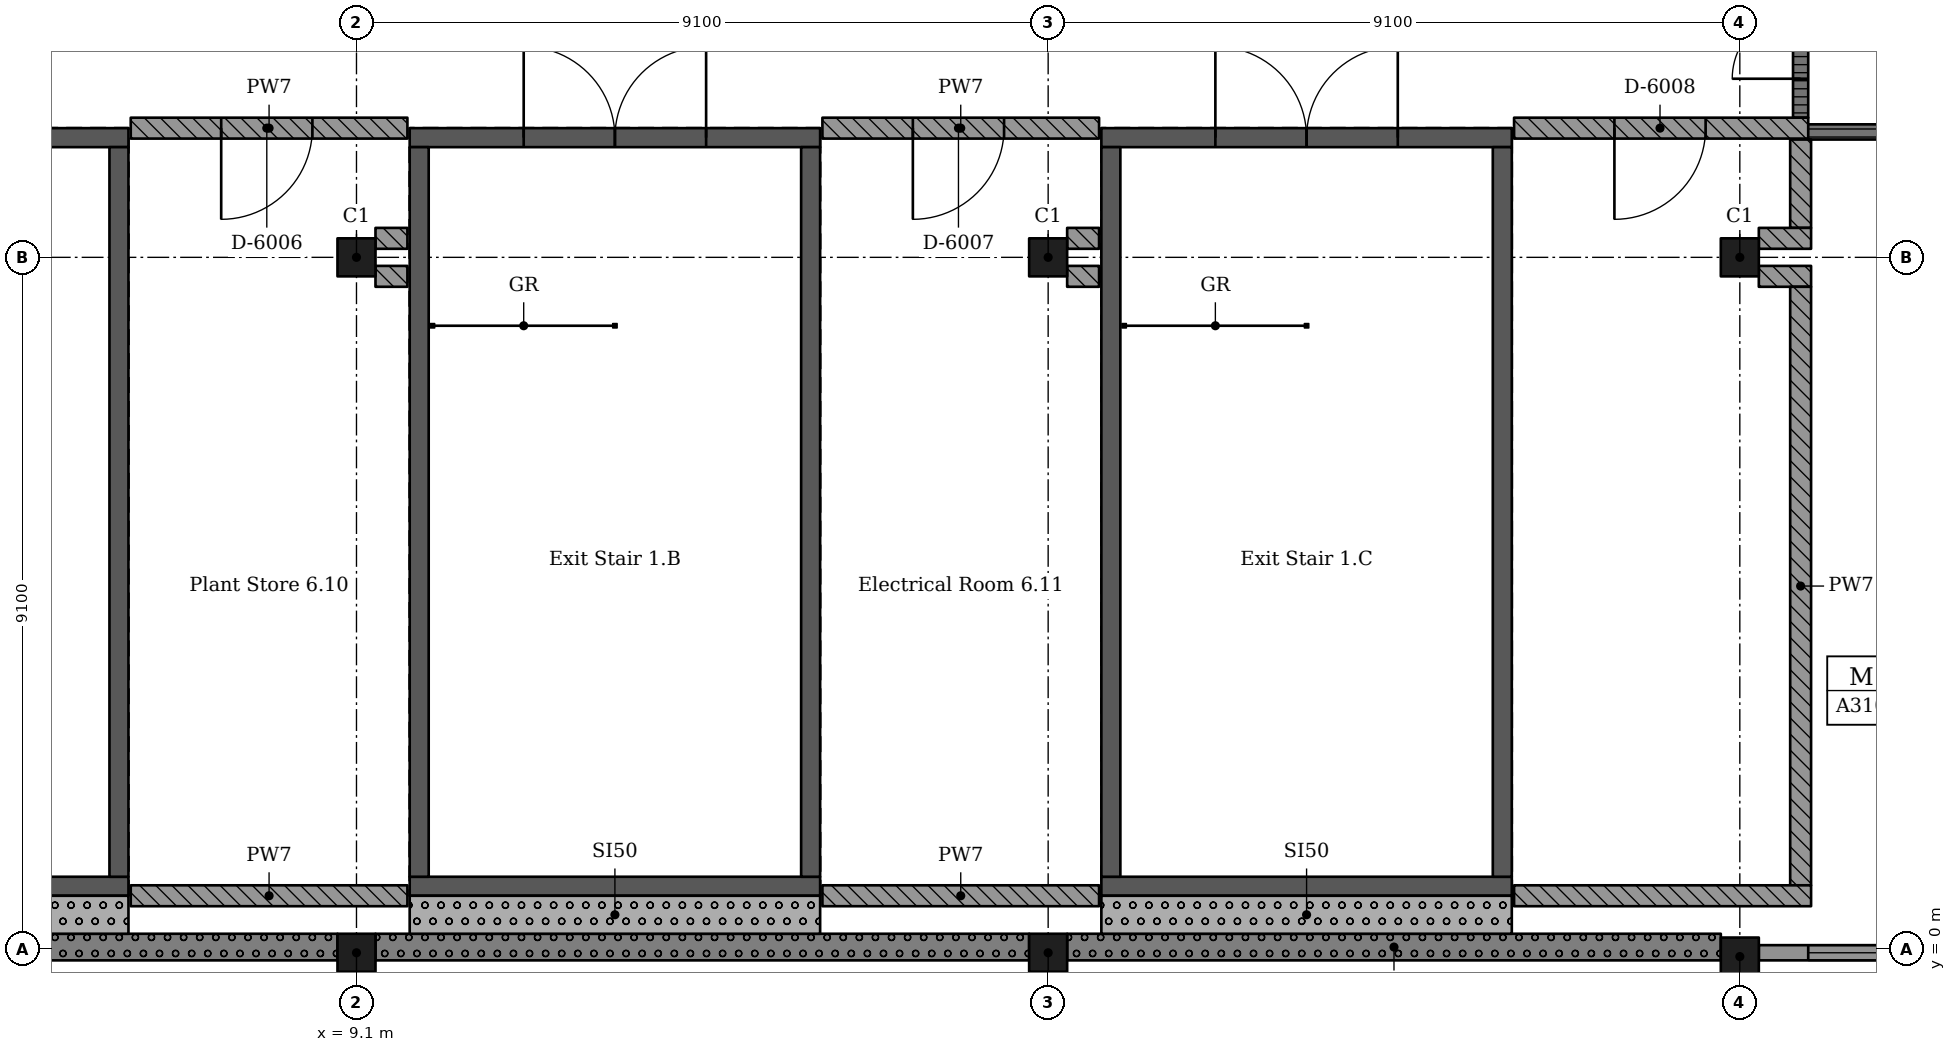
"""IFC4 building model, lengths in metres.
Left out: names, types, materials, properties, quantities, classifications, styles, units other than length and angle.
Written with IfcOpenShell. Run it as: python <this file> out.ifc"""

import sys

from ifc_helpers import new_model, si_unit, direction, frame, frame_2d, origin, origin_2d, place, context, subcontext, project, spatial, rectangle, extrude, element, fill, save


model = new_model("IFC4")
c1 = context("Model", 3, precision=1e-05, world=origin(), true_north=direction((0.0, 1.0)))
c2 = subcontext(c1, "Body", "Model", "MODEL_VIEW")
j1 = project(units=[si_unit("LENGTHUNIT", "METRE"), si_unit("PLANEANGLEUNIT", "RADIAN")], contexts=[c1])
p1 = place(None, origin())
s1 = spatial("IfcSite", under=j1, at=p1, CompositionType="ELEMENT")
p2 = place(p1, origin())
s2 = spatial("IfcBuilding", under=s1, at=p2, CompositionType="ELEMENT")
p3 = place(p2, frame((0.0, 0.0, 29.12)))
s3 = spatial("IfcBuildingStorey", under=s2, at=p3, CompositionType="ELEMENT", Elevation=29.12)
for number, where, z_axis, x_axis in (
    (1, (9.1, -0.05, 0.0), (0.0, 0.0, 1.0), (1.0, 0.0, 0.0)),
    (2, (9.1, 9.1, 0.0), (0.0, 0.0, 1.0), (1.0, 0.0, 0.0)),
    (3, (18.2, -0.05, 0.0), (0.0, 0.0, 1.0), (1.0, 0.0, 0.0)),
    (4, (18.2, 9.1, 0.0), (0.0, 0.0, 1.0), (1.0, 0.0, 0.0)),
    (5, (27.3, -0.1, 0.0), (0.0, 0.0, 1.0), (1.0, 0.0, 0.0)),
    (6, (27.3, 9.1, 0.0), (0.0, 0.0, 1.0), (1.0, 0.0, 0.0)),
):
    element("IfcColumn", number, at=place(p3, frame(where, z_axis=z_axis, x_axis=x_axis)), inside=s3, PredefinedType="COLUMN", context=c2, shape_type="SweptSolid", body=[
        extrude(rectangle(XDim=0.5, YDim=0.5, at=origin_2d()), origin(), (0.0, 0.0, 1.0), 4.55),
    ])
p4 = place(p3, frame((6.1, 0.825, 0.0), z_axis=(0.0, 0.0, 1.0), x_axis=(-1.0, 0.0, 0.0)))
e7 = element("IfcWall", 7, at=p4, inside=s3, PredefinedType="SHEAR", context=c2, shape_type="SweptSolid", body=[
    extrude(rectangle(XDim=5.4, YDim=0.25, at=frame_2d((2.7, 0.0))), origin(), (0.0, 0.0, 1.0), 4.55),
])
p5 = place(p3, frame((6.1, 10.675, 0.0), z_axis=(0.0, 0.0, 1.0), x_axis=(-1.0, 0.0, 0.0)))
e8 = element("IfcWall", 8, at=p5, inside=s3, PredefinedType="SHEAR", context=c2, shape_type="SweptSolid", body=[
    extrude(rectangle(XDim=5.4, YDim=0.25, at=frame_2d((2.7, 0.0))), origin(), (0.0, 0.0, 1.0), 4.55),
])
p6 = place(p5, frame((1.5, 0.0, 0.0)))
e9 = element("IfcOpeningElement", 9, at=p6, cuts=e8, PredefinedType="OPENING", context=c2, shape_type="SweptSolid", body=[
    extrude(rectangle(XDim=2.4, YDim=2.1, at=frame_2d((1.2, 1.05))), frame((0.0, 0.135, 0.0), z_axis=(0.0, -1.0, 0.0), x_axis=(1.0, 0.0, 0.0)), (0.0, 0.0, 1.0), 0.27),
])
p7 = place(p3, frame((5.975, 10.55, 0.0), z_axis=(0.0, 0.0, 1.0), x_axis=(0.0, -1.0, 0.0)))
e10 = element("IfcWall", 10, at=p7, inside=s3, PredefinedType="SHEAR", context=c2, shape_type="SweptSolid", body=[
    extrude(rectangle(XDim=9.6, YDim=0.25, at=frame_2d((4.8, 0.0))), origin(), (0.0, 0.0, 1.0), 4.55),
])
p8 = place(p3, frame((15.2, 0.825, 0.0), z_axis=(0.0, 0.0, 1.0), x_axis=(-1.0, 0.0, 0.0)))
e11 = element("IfcWall", 11, at=p8, inside=s3, PredefinedType="SHEAR", context=c2, shape_type="SweptSolid", body=[
    extrude(rectangle(XDim=5.4, YDim=0.25, at=frame_2d((2.7, 0.0))), origin(), (0.0, 0.0, 1.0), 4.55),
])
p9 = place(p3, frame((15.2, 10.675, 0.0), z_axis=(0.0, 0.0, 1.0), x_axis=(-1.0, 0.0, 0.0)))
e12 = element("IfcWall", 12, at=p9, inside=s3, PredefinedType="SHEAR", context=c2, shape_type="SweptSolid", body=[
    extrude(rectangle(XDim=5.4, YDim=0.25, at=frame_2d((2.7, 0.0))), origin(), (0.0, 0.0, 1.0), 4.55),
])
p10 = place(p9, frame((1.5, 0.0, 0.0)))
e13 = element("IfcOpeningElement", 13, at=p10, cuts=e12, PredefinedType="OPENING", context=c2, shape_type="SweptSolid", body=[
    extrude(rectangle(XDim=2.4, YDim=2.1, at=frame_2d((1.2, 1.05))), frame((0.0, 0.135, 0.0), z_axis=(0.0, -1.0, 0.0), x_axis=(1.0, 0.0, 0.0)), (0.0, 0.0, 1.0), 0.27),
])
for number, where, z_axis, x_axis in (
    (14, (9.925, 10.55, 0.0), (0.0, 0.0, 1.0), (0.0, -1.0, 0.0)),
    (15, (15.075, 10.55, 0.0), (0.0, 0.0, 1.0), (0.0, -1.0, 0.0)),
):
    element("IfcWall", number, at=place(p3, frame(where, z_axis=z_axis, x_axis=x_axis)), inside=s3, PredefinedType="SHEAR", context=c2, shape_type="SweptSolid", body=[
        extrude(rectangle(XDim=9.6, YDim=0.25, at=frame_2d((4.8, 0.0))), origin(), (0.0, 0.0, 1.0), 4.55),
    ])
p11 = place(p3, frame((24.3, 0.825, 0.0), z_axis=(0.0, 0.0, 1.0), x_axis=(-1.0, 0.0, 0.0)))
e16 = element("IfcWall", 16, at=p11, inside=s3, PredefinedType="SHEAR", context=c2, shape_type="SweptSolid", body=[
    extrude(rectangle(XDim=5.4, YDim=0.25, at=frame_2d((2.7, 0.0))), origin(), (0.0, 0.0, 1.0), 4.55),
])
p12 = place(p3, frame((24.3, 10.675, 0.0), z_axis=(0.0, 0.0, 1.0), x_axis=(-1.0, 0.0, 0.0)))
e17 = element("IfcWall", 17, at=p12, inside=s3, PredefinedType="SHEAR", context=c2, shape_type="SweptSolid", body=[
    extrude(rectangle(XDim=5.4, YDim=0.25, at=frame_2d((2.7, 0.0))), origin(), (0.0, 0.0, 1.0), 4.55),
])
p13 = place(p12, frame((1.5, 0.0, 0.0)))
e18 = element("IfcOpeningElement", 18, at=p13, cuts=e17, PredefinedType="OPENING", context=c2, shape_type="SweptSolid", body=[
    extrude(rectangle(XDim=2.4, YDim=2.1, at=frame_2d((1.2, 1.05))), frame((0.0, 0.135, 0.0), z_axis=(0.0, -1.0, 0.0), x_axis=(1.0, 0.0, 0.0)), (0.0, 0.0, 1.0), 0.27),
])
for number, where, z_axis, x_axis in (
    (19, (19.025, 10.55, 0.0), (0.0, 0.0, 1.0), (0.0, -1.0, 0.0)),
    (20, (24.175, 10.55, 0.0), (0.0, 0.0, 1.0), (0.0, -1.0, 0.0)),
):
    element("IfcWall", number, at=place(p3, frame(where, z_axis=z_axis, x_axis=x_axis)), inside=s3, PredefinedType="SHEAR", context=c2, shape_type="SweptSolid", body=[
        extrude(rectangle(XDim=9.6, YDim=0.25, at=frame_2d((4.8, 0.0))), origin(), (0.0, 0.0, 1.0), 4.55),
    ])
p14 = place(p3, frame((0.25, 0.025, 0.0), z_axis=(0.0, 0.0, 1.0), x_axis=(1.0, 0.0, 0.0)))
e21 = element("IfcWall", 21, at=p14, inside=s3, PredefinedType="SOLIDWALL", context=c2, shape_type="SweptSolid", body=[
    extrude(rectangle(XDim=8.6, YDim=0.35, at=frame_2d((4.3, 0.0))), origin(), (0.0, 0.0, 1.0), 4.5),
])
p15 = place(p3, frame((9.35, 0.025, 0.0), z_axis=(0.0, 0.0, 1.0), x_axis=(1.0, 0.0, 0.0)))
e22 = element("IfcWall", 22, at=p15, inside=s3, PredefinedType="SOLIDWALL", context=c2, shape_type="SweptSolid", body=[
    extrude(rectangle(XDim=8.6, YDim=0.35, at=frame_2d((4.3, 0.0))), origin(), (0.0, 0.0, 1.0), 4.5),
])
p16 = place(p3, frame((18.45, 0.025, 0.0), z_axis=(0.0, 0.0, 1.0), x_axis=(1.0, 0.0, 0.0)))
e23 = element("IfcWall", 23, at=p16, inside=s3, PredefinedType="SOLIDWALL", context=c2, shape_type="SweptSolid", body=[
    extrude(rectangle(XDim=8.6, YDim=0.35, at=frame_2d((4.3, 0.0))), origin(), (0.0, 0.0, 1.0), 4.5),
])
p17 = place(p3, frame((27.55, -0.05, 0.0), z_axis=(0.0, 0.0, 1.0), x_axis=(1.0, 0.0, 0.0)))
e24 = element("IfcWall", 24, at=p17, inside=s3, PredefinedType="SOLIDWALL", context=c2, shape_type="SweptSolid", body=[
    extrude(rectangle(XDim=8.6, YDim=0.2, at=frame_2d((4.3, 0.0))), origin(), (0.0, 0.0, 1.0), 4.5),
])
p18 = place(p17, frame((0.65, 0.0, 0.6)))
e25 = element("IfcOpeningElement", 25, at=p18, cuts=e24, PredefinedType="OPENING", context=c2, shape_type="SweptSolid", body=[
    extrude(rectangle(XDim=3.0, YDim=3.0, at=frame_2d((1.5, 1.5))), frame((0.0, 0.11, 0.0), z_axis=(0.0, -1.0, 0.0), x_axis=(1.0, 0.0, 0.0)), (0.0, 0.0, 1.0), 0.22),
])
p19 = place(p17, frame((4.95, 0.0, 0.6)))
e26 = element("IfcOpeningElement", 26, at=p19, cuts=e24, PredefinedType="OPENING", context=c2, shape_type="SweptSolid", body=[
    extrude(rectangle(XDim=3.0, YDim=3.0, at=frame_2d((1.5, 1.5))), frame((0.0, 0.11, 0.0), z_axis=(0.0, -1.0, 0.0), x_axis=(1.0, 0.0, 0.0)), (0.0, 0.0, 1.0), 0.22),
])
p20 = place(p3, frame((0.7, 0.45, 0.0), z_axis=(0.0, 0.0, 1.0), x_axis=(1.0, 0.0, 0.0)))
e27 = element("IfcWall", 27, at=p20, inside=s3, PredefinedType="SOLIDWALL", context=c2, shape_type="SweptSolid", body=[
    extrude(rectangle(XDim=5.4, YDim=0.5, at=frame_2d((2.7, 0.0))), origin(), (0.0, 0.0, 1.0), 3.88),
])
p21 = place(p3, frame((9.8, 0.45, 0.0), z_axis=(0.0, 0.0, 1.0), x_axis=(1.0, 0.0, 0.0)))
e28 = element("IfcWall", 28, at=p21, inside=s3, PredefinedType="SOLIDWALL", context=c2, shape_type="SweptSolid", body=[
    extrude(rectangle(XDim=5.4, YDim=0.5, at=frame_2d((2.7, 0.0))), origin(), (0.0, 0.0, 1.0), 3.88),
])
p22 = place(p3, frame((18.9, 0.45, 0.0), z_axis=(0.0, 0.0, 1.0), x_axis=(1.0, 0.0, 0.0)))
e29 = element("IfcWall", 29, at=p22, inside=s3, PredefinedType="SOLIDWALL", context=c2, shape_type="SweptSolid", body=[
    extrude(rectangle(XDim=5.4, YDim=0.5, at=frame_2d((2.7, 0.0))), origin(), (0.0, 0.0, 1.0), 3.88),
])
p23 = place(p3, frame((9.35, 8.85, 0.0), z_axis=(0.0, 0.0, 1.0), x_axis=(1.0, 0.0, 0.0)))
e30 = element("IfcWall", 30, at=p23, inside=s3, PredefinedType="SOLIDWALL", context=c2, shape_type="SweptSolid", body=[
    extrude(rectangle(XDim=0.42, YDim=0.275, at=frame_2d((0.21, 0.0))), origin(), (0.0, 0.0, 1.0), 3.88),
])
p24 = place(p3, frame((9.77, 0.7, 0.0), z_axis=(0.0, 0.0, 1.0), x_axis=(-1.0, 0.0, 0.0)))
e31 = element("IfcWall", 31, at=p24, inside=s3, PredefinedType="SOLIDWALL", context=c2, shape_type="SweptSolid", body=[
    extrude(rectangle(XDim=3.64, YDim=0.275, at=frame_2d((1.82, 0.0))), origin(), (0.0, 0.0, 1.0), 3.88),
])
p25 = place(p3, frame((9.77, 9.35, 0.0), z_axis=(0.0, 0.0, 1.0), x_axis=(-1.0, 0.0, 0.0)))
e32 = element("IfcWall", 32, at=p25, inside=s3, PredefinedType="SOLIDWALL", context=c2, shape_type="SweptSolid", body=[
    extrude(rectangle(XDim=0.42, YDim=0.275, at=frame_2d((0.21, 0.0))), origin(), (0.0, 0.0, 1.0), 3.88),
])
p26 = place(p3, frame((9.77, 10.8, 0.0), z_axis=(0.0, 0.0, 1.0), x_axis=(-1.0, 0.0, 0.0)))
e33 = element("IfcWall", 33, at=p26, inside=s3, PredefinedType="SOLIDWALL", context=c2, shape_type="SweptSolid", body=[
    extrude(rectangle(XDim=3.64, YDim=0.275, at=frame_2d((1.82, 0.0))), origin(), (0.0, 0.0, 1.0), 3.88),
])
p27 = place(p26, frame((1.25, 0.0, 0.0)))
e34 = element("IfcOpeningElement", 34, at=p27, cuts=e33, PredefinedType="OPENING", context=c2, shape_type="SweptSolid", body=[
    extrude(rectangle(XDim=1.2, YDim=2.4, at=frame_2d((0.6, 1.2))), frame((0.0, 0.147, 0.0), z_axis=(0.0, -1.0, 0.0), x_axis=(1.0, 0.0, 0.0)), (0.0, 0.0, 1.0), 0.295),
])
p28 = place(p3, frame((18.45, 8.85, 0.0), z_axis=(0.0, 0.0, 1.0), x_axis=(1.0, 0.0, 0.0)))
e35 = element("IfcWall", 35, at=p28, inside=s3, PredefinedType="SOLIDWALL", context=c2, shape_type="SweptSolid", body=[
    extrude(rectangle(XDim=0.42, YDim=0.275, at=frame_2d((0.21, 0.0))), origin(), (0.0, 0.0, 1.0), 3.88),
])
p29 = place(p3, frame((18.87, 0.7, 0.0), z_axis=(0.0, 0.0, 1.0), x_axis=(-1.0, 0.0, 0.0)))
e36 = element("IfcWall", 36, at=p29, inside=s3, PredefinedType="SOLIDWALL", context=c2, shape_type="SweptSolid", body=[
    extrude(rectangle(XDim=3.64, YDim=0.275, at=frame_2d((1.82, 0.0))), origin(), (0.0, 0.0, 1.0), 3.88),
])
p30 = place(p3, frame((18.87, 9.35, 0.0), z_axis=(0.0, 0.0, 1.0), x_axis=(-1.0, 0.0, 0.0)))
e37 = element("IfcWall", 37, at=p30, inside=s3, PredefinedType="SOLIDWALL", context=c2, shape_type="SweptSolid", body=[
    extrude(rectangle(XDim=0.42, YDim=0.275, at=frame_2d((0.21, 0.0))), origin(), (0.0, 0.0, 1.0), 3.88),
])
p31 = place(p3, frame((18.87, 10.8, 0.0), z_axis=(0.0, 0.0, 1.0), x_axis=(-1.0, 0.0, 0.0)))
e38 = element("IfcWall", 38, at=p31, inside=s3, PredefinedType="SOLIDWALL", context=c2, shape_type="SweptSolid", body=[
    extrude(rectangle(XDim=3.64, YDim=0.275, at=frame_2d((1.82, 0.0))), origin(), (0.0, 0.0, 1.0), 3.88),
])
p32 = place(p31, frame((1.25, 0.0, 0.0)))
e39 = element("IfcOpeningElement", 39, at=p32, cuts=e38, PredefinedType="OPENING", context=c2, shape_type="SweptSolid", body=[
    extrude(rectangle(XDim=1.2, YDim=2.4, at=frame_2d((0.6, 1.2))), frame((0.0, 0.147, 0.0), z_axis=(0.0, -1.0, 0.0), x_axis=(1.0, 0.0, 0.0)), (0.0, 0.0, 1.0), 0.295),
])
p33 = place(p3, frame((27.55, 8.85, 0.0), z_axis=(0.0, 0.0, 1.0), x_axis=(1.0, 0.0, 0.0)))
e40 = element("IfcWall", 40, at=p33, inside=s3, PredefinedType="SOLIDWALL", context=c2, shape_type="SweptSolid", body=[
    extrude(rectangle(XDim=0.688, YDim=0.275, at=frame_2d((0.344, 0.0))), origin(), (0.0, 0.0, 1.0), 3.88),
])
p34 = place(p3, frame((28.1, 8.712, 0.0), z_axis=(0.0, 0.0, 1.0), x_axis=(0.0, -1.0, 0.0)))
e41 = element("IfcWall", 41, at=p34, inside=s3, PredefinedType="SOLIDWALL", context=c2, shape_type="SweptSolid", body=[
    extrude(rectangle(XDim=7.875, YDim=0.275, at=frame_2d((3.938, 0.0))), origin(), (0.0, 0.0, 1.0), 3.88),
])
p35 = place(p3, frame((28.1, 10.65, 0.0), z_axis=(0.0, 0.0, 1.0), x_axis=(0.0, -1.0, 0.0)))
e42 = element("IfcWall", 42, at=p35, inside=s3, PredefinedType="SOLIDWALL", context=c2, shape_type="SweptSolid", body=[
    extrude(rectangle(XDim=1.162, YDim=0.275, at=frame_2d((0.581, 0.0))), origin(), (0.0, 0.0, 1.0), 3.88),
])
p36 = place(p3, frame((28.1, 13.7, 0.0), z_axis=(0.0, 0.0, 1.0), x_axis=(0.0, -1.0, 0.0)))
e43 = element("IfcWall", 43, at=p36, inside=s3, PredefinedType="PARTITIONING", context=c2, shape_type="SweptSolid", body=[
    extrude(rectangle(XDim=2.762, YDim=0.2, at=frame_2d((1.381, 0.0))), origin(), (0.0, 0.0, 1.0), 3.88),
])
p37 = place(p36, frame((0.45, 0.0, 0.0)))
e44 = element("IfcOpeningElement", 44, at=p37, cuts=e43, PredefinedType="OPENING", context=c2, shape_type="SweptSolid", body=[
    extrude(rectangle(XDim=1.8, YDim=2.4, at=frame_2d((0.9, 1.2))), frame((0.0, 0.11, 0.0), z_axis=(0.0, -1.0, 0.0), x_axis=(1.0, 0.0, 0.0)), (0.0, 0.0, 1.0), 0.22),
])
p38 = place(p3, frame((28.2, 10.8, 0.0), z_axis=(0.0, 0.0, 1.0), x_axis=(-1.0, 0.0, 0.0)))
e45 = element("IfcWall", 45, at=p38, inside=s3, PredefinedType="SOLIDWALL", context=c2, shape_type="SweptSolid", body=[
    extrude(rectangle(XDim=3.87, YDim=0.275, at=frame_2d((1.935, 0.0))), origin(), (0.0, 0.0, 1.0), 3.88),
])
p39 = place(p38, frame((1.35, 0.0, 0.0)))
e46 = element("IfcOpeningElement", 46, at=p39, cuts=e45, PredefinedType="OPENING", context=c2, shape_type="SweptSolid", body=[
    extrude(rectangle(XDim=1.2, YDim=2.4, at=frame_2d((0.6, 1.2))), frame((0.0, 0.147, 0.0), z_axis=(0.0, -1.0, 0.0), x_axis=(1.0, 0.0, 0.0)), (0.0, 0.0, 1.0), 0.295),
])
p40 = place(p3, frame((28.238, 0.7, 0.0), z_axis=(0.0, 0.0, 1.0), x_axis=(-1.0, 0.0, 0.0)))
e47 = element("IfcWall", 47, at=p40, inside=s3, PredefinedType="SOLIDWALL", context=c2, shape_type="SweptSolid", body=[
    extrude(rectangle(XDim=3.907, YDim=0.275, at=frame_2d((1.954, 0.0))), origin(), (0.0, 0.0, 1.0), 3.88),
])
p41 = place(p3, frame((28.238, 9.35, 0.0), z_axis=(0.0, 0.0, 1.0), x_axis=(-1.0, 0.0, 0.0)))
e48 = element("IfcWall", 48, at=p41, inside=s3, PredefinedType="SOLIDWALL", context=c2, shape_type="SweptSolid", body=[
    extrude(rectangle(XDim=0.688, YDim=0.275, at=frame_2d((0.344, 0.0))), origin(), (0.0, 0.0, 1.0), 3.88),
])
p42 = place(p3, frame((33.525, 10.75, 0.0), z_axis=(0.0, 0.0, 1.0), x_axis=(-1.0, 0.0, 0.0)))
e49 = element("IfcWall", 49, at=p42, inside=s3, PredefinedType="PARTITIONING", context=c2, shape_type="SweptSolid", body=[
    extrude(rectangle(XDim=5.562, YDim=0.2, at=frame_2d((2.781, 0.0))), origin(), (0.0, 0.0, 1.0), 3.88),
])
p43 = place(p18, origin())
e50 = element("IfcWindow", 50, at=p43, inside=s3, PartitioningType="SINGLE_PANEL", PredefinedType="WINDOW", context=c2, shape_type="SweptSolid", body=[
    extrude(rectangle(XDim=3.0, YDim=3.0, at=frame_2d((1.5, 1.5))), frame((0.0, 0.03, 0.0), z_axis=(0.0, -1.0, 0.0), x_axis=(1.0, 0.0, 0.0)), (0.0, 0.0, 1.0), 0.06),
])
fill(e25, e50)
p44 = place(p27, origin())
e51 = element("IfcDoor", 51, at=p44, inside=s3, OperationType="SINGLE_SWING_LEFT", PredefinedType="DOOR", context=c2, shape_type="SweptSolid", body=[
    extrude(rectangle(XDim=1.2, YDim=2.4, at=frame_2d((0.6, 1.2))), frame((0.0, 0.025, 0.0), z_axis=(0.0, -1.0, 0.0), x_axis=(1.0, 0.0, 0.0)), (0.0, 0.0, 1.0), 0.05),
])
fill(e34, e51)
p45 = place(p32, origin())
e52 = element("IfcDoor", 52, at=p45, inside=s3, OperationType="SINGLE_SWING_LEFT", PredefinedType="DOOR", context=c2, shape_type="SweptSolid", body=[
    extrude(rectangle(XDim=1.2, YDim=2.4, at=frame_2d((0.6, 1.2))), frame((0.0, 0.025, 0.0), z_axis=(0.0, -1.0, 0.0), x_axis=(1.0, 0.0, 0.0)), (0.0, 0.0, 1.0), 0.05),
])
fill(e39, e52)
p46 = place(p39, origin())
e53 = element("IfcDoor", 53, at=p46, inside=s3, OperationType="SINGLE_SWING_LEFT", PredefinedType="DOOR", context=c2, shape_type="SweptSolid", body=[
    extrude(rectangle(XDim=1.2, YDim=2.4, at=frame_2d((0.6, 1.2))), frame((0.0, 0.025, 0.0), z_axis=(0.0, -1.0, 0.0), x_axis=(1.0, 0.0, 0.0)), (0.0, 0.0, 1.0), 0.05),
])
fill(e46, e53)
p47 = place(p37, origin())
e54 = element("IfcDoor", 54, at=p47, inside=s3, OperationType="DOUBLE_DOOR_SINGLE_SWING", PredefinedType="DOOR", context=c2, shape_type="SweptSolid", body=[
    extrude(rectangle(XDim=1.8, YDim=2.4, at=frame_2d((0.9, 1.2))), frame((0.0, 0.025, 0.0), z_axis=(0.0, -1.0, 0.0), x_axis=(1.0, 0.0, 0.0)), (0.0, 0.0, 1.0), 0.05),
])
fill(e44, e54)
p48 = place(p10, origin())
e55 = element("IfcDoor", 55, at=p48, inside=s3, OperationType="DOUBLE_DOOR_SINGLE_SWING", PredefinedType="DOOR", context=c2, shape_type="SweptSolid", body=[
    extrude(rectangle(XDim=2.4, YDim=2.1, at=frame_2d((1.2, 1.05))), frame((0.0, 0.025, 0.0), z_axis=(0.0, -1.0, 0.0), x_axis=(1.0, 0.0, 0.0)), (0.0, 0.0, 1.0), 0.05),
])
fill(e13, e55)
p49 = place(p13, origin())
e56 = element("IfcDoor", 56, at=p49, inside=s3, OperationType="DOUBLE_DOOR_SINGLE_SWING", PredefinedType="DOOR", context=c2, shape_type="SweptSolid", body=[
    extrude(rectangle(XDim=2.4, YDim=2.1, at=frame_2d((1.2, 1.05))), frame((0.0, 0.025, 0.0), z_axis=(0.0, -1.0, 0.0), x_axis=(1.0, 0.0, 0.0)), (0.0, 0.0, 1.0), 0.05),
])
fill(e18, e56)
save(model, sys.argv[1])
